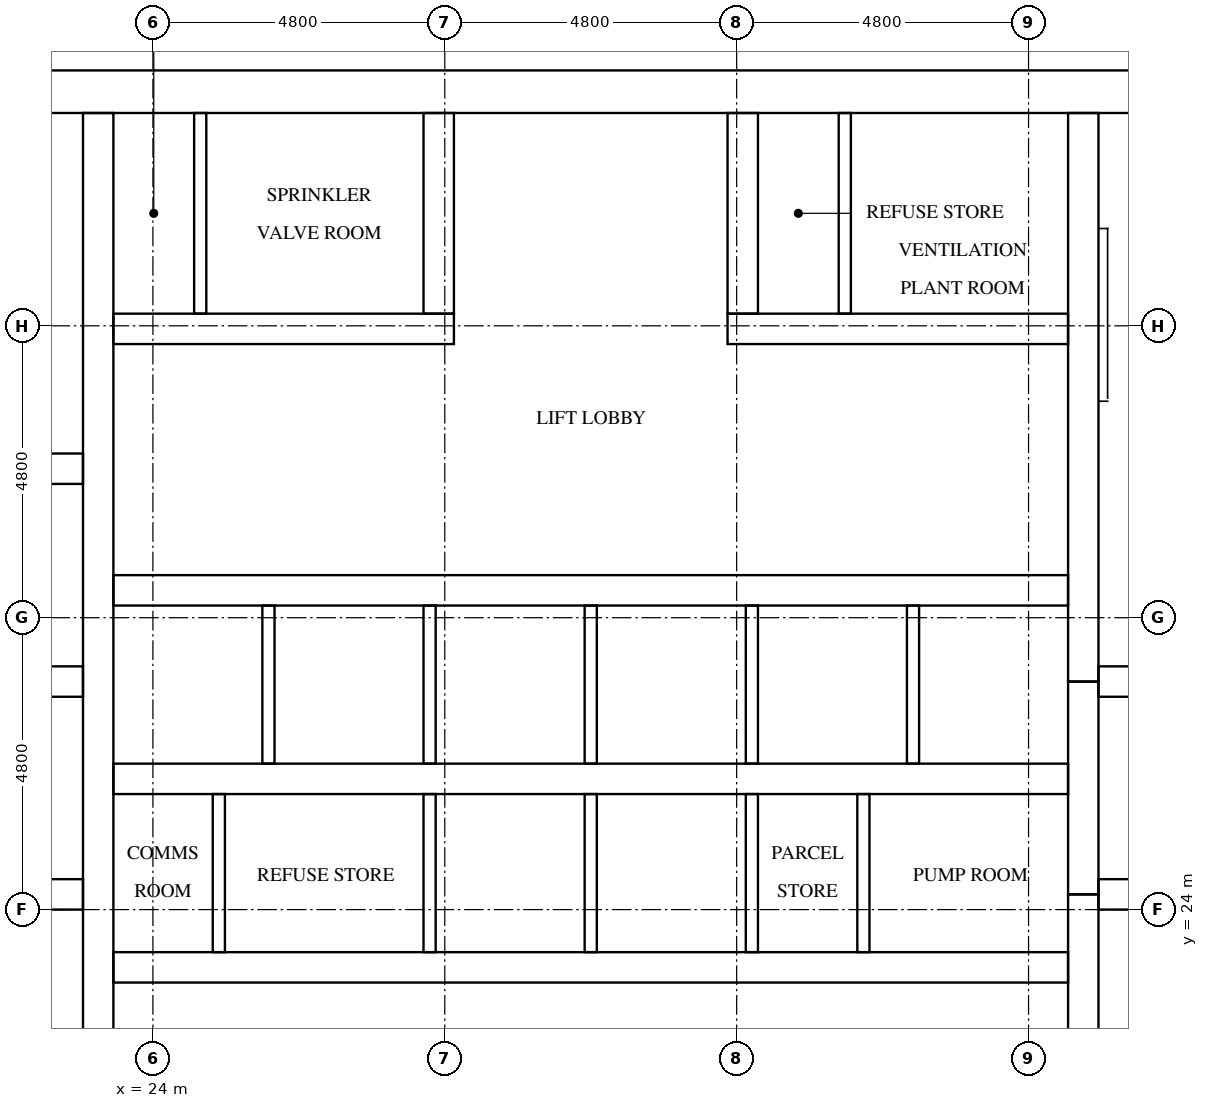
"""IFC4 building model, lengths in metres.
Left out: names, types, materials, properties, quantities, classifications, styles, units other than length and angle.
Written with IfcOpenShell. Run it as: python <this file> out.ifc"""

import sys

from ifc_helpers import new_model, si_unit, direction, frame, frame_2d, origin, place, context, subcontext, project, spatial, rectangle, extrude, element, fill, save


model = new_model("IFC4")
c1 = context("Model", 3, precision=1e-05, world=origin(), true_north=direction((0.0, 1.0)))
c2 = subcontext(c1, "Body", "Model", "MODEL_VIEW")
j1 = project(units=[si_unit("LENGTHUNIT", "METRE"), si_unit("PLANEANGLEUNIT", "RADIAN")], contexts=[c1])
p1 = place(None, origin())
s1 = spatial("IfcSite", under=j1, at=p1, CompositionType="ELEMENT")
p2 = place(p1, origin())
s2 = spatial("IfcBuilding", under=s1, at=p2, CompositionType="ELEMENT")
p3 = place(p2, frame((0.0, 0.0, 178.9)))
s3 = spatial("IfcBuildingStorey", under=s2, at=p3, CompositionType="ELEMENT", Elevation=178.9)
p4 = place(p3, frame((15.0, 37.45, 0.0), z_axis=(0.0, 0.0, 1.0), x_axis=(1.0, 0.0, 0.0)))
e1 = element("IfcWall", 1, at=p4, inside=s3, PredefinedType="SHEAR", context=c2, shape_type="SweptSolid", body=[
    extrude(rectangle(XDim=32.4, YDim=0.7, at=frame_2d((16.2, 0.0))), origin(), (0.0, 0.0, 1.0), 3.2),
])
p5 = place(p4, frame((15.3, 0.0, 0.0)))
e2 = element("IfcOpeningElement", 2, at=p5, cuts=e1, PredefinedType="OPENING", context=c2, shape_type="SweptSolid", body=[
    extrude(rectangle(XDim=1.8, YDim=2.1, at=frame_2d((0.9, 1.05))), frame((0.0, 0.36, 0.0), z_axis=(0.0, -1.0, 0.0), x_axis=(1.0, 0.0, 0.0)), (0.0, 0.0, 1.0), 0.72),
])
p6 = place(p4, frame((1.544, 0.0, 0.0)))
e3 = element("IfcOpeningElement", 3, at=p6, cuts=e1, PredefinedType="OPENING", context=c2, shape_type="SweptSolid", body=[
    extrude(rectangle(XDim=1.0, YDim=2.1, at=frame_2d((0.5, 1.05))), frame((0.0, 0.36, 0.0), z_axis=(0.0, -1.0, 0.0), x_axis=(1.0, 0.0, 0.0)), (0.0, 0.0, 1.0), 0.72),
])
p7 = place(p4, frame((5.219, 0.0, 0.0)))
e4 = element("IfcOpeningElement", 4, at=p7, cuts=e1, PredefinedType="OPENING", context=c2, shape_type="SweptSolid", body=[
    extrude(rectangle(XDim=1.0, YDim=2.1, at=frame_2d((0.5, 1.05))), frame((0.0, 0.36, 0.0), z_axis=(0.0, -1.0, 0.0), x_axis=(1.0, 0.0, 0.0)), (0.0, 0.0, 1.0), 0.72),
])
p8 = place(p3, frame((23.1, 15.7, 0.0), z_axis=(0.0, 0.0, 1.0), x_axis=(0.0, 1.0, 0.0)))
e5 = element("IfcWall", 5, at=p8, inside=s3, PredefinedType="SHEAR", context=c2, shape_type="SweptSolid", body=[
    extrude(rectangle(XDim=21.4, YDim=0.5, at=frame_2d((10.7, 0.0))), origin(), (0.0, 0.0, 1.0), 3.2),
])
p9 = place(p3, frame((39.3, 15.7, 0.0), z_axis=(0.0, 0.0, 1.0), x_axis=(0.0, 1.0, 0.0)))
e6 = element("IfcWall", 6, at=p9, inside=s3, PredefinedType="SHEAR", context=c2, shape_type="SweptSolid", body=[
    extrude(rectangle(XDim=8.55, YDim=0.5, at=frame_2d((4.275, 0.0))), origin(), (0.0, 0.0, 1.0), 3.2),
])
p10 = place(p3, frame((39.3, 24.25, 0.0), z_axis=(0.0, 0.0, 1.0), x_axis=(0.0, 1.0, 0.0)))
e7 = element("IfcWall", 7, at=p10, inside=s3, PredefinedType="SHEAR", context=c2, shape_type="SweptSolid", body=[
    extrude(rectangle(XDim=3.5, YDim=0.5, at=frame_2d((1.75, 0.0))), origin(), (0.0, 0.0, 1.0), 3.2),
])
p11 = place(p3, frame((39.3, 27.75, 0.0), z_axis=(0.0, 0.0, 1.0), x_axis=(0.0, 1.0, 0.0)))
e8 = element("IfcWall", 8, at=p11, inside=s3, PredefinedType="SHEAR", context=c2, shape_type="SweptSolid", body=[
    extrude(rectangle(XDim=9.35, YDim=0.5, at=frame_2d((4.675, 0.0))), origin(), (0.0, 0.0, 1.0), 3.2),
])
for number, where, z_axis, x_axis in (
    (9, (19.3, 24.25, 0.0), (0.0, 0.0, 1.0), (1.0, 0.0, 0.0)),
    (10, (19.3, 27.75, 0.0), (0.0, 0.0, 1.0), (1.0, 0.0, 0.0)),
):
    element("IfcWall", number, at=place(p3, frame(where, z_axis=z_axis, x_axis=x_axis)), inside=s3, PredefinedType="SHEAR", context=c2, shape_type="SweptSolid", body=[
        extrude(rectangle(XDim=3.55, YDim=0.5, at=frame_2d((1.775, 0.0))), origin(), (0.0, 0.0, 1.0), 3.2),
    ])
p12 = place(p3, frame((15.7, 31.25, 0.0), z_axis=(0.0, 0.0, 1.0), x_axis=(1.0, 0.0, 0.0)))
e11 = element("IfcWall", 11, at=p12, inside=s3, PredefinedType="SHEAR", context=c2, shape_type="SweptSolid", body=[
    extrude(rectangle(XDim=7.15, YDim=0.5, at=frame_2d((3.575, 0.0))), origin(), (0.0, 0.0, 1.0), 3.2),
])
for number, where, z_axis, x_axis in (
    (12, (39.55, 24.25, 0.0), (0.0, 0.0, 1.0), (1.0, 0.0, 0.0)),
    (13, (39.55, 27.75, 0.0), (0.0, 0.0, 1.0), (1.0, 0.0, 0.0)),
):
    element("IfcWall", number, at=place(p3, frame(where, z_axis=z_axis, x_axis=x_axis)), inside=s3, PredefinedType="SHEAR", context=c2, shape_type="SweptSolid", body=[
        extrude(rectangle(XDim=3.55, YDim=0.5, at=frame_2d((1.775, 0.0))), origin(), (0.0, 0.0, 1.0), 3.2),
    ])
p13 = place(p3, frame((23.35, 23.05, 0.0), z_axis=(0.0, 0.0, 1.0), x_axis=(1.0, 0.0, 0.0)))
e14 = element("IfcWall", 14, at=p13, inside=s3, PredefinedType="SHEAR", context=c2, shape_type="SweptSolid", body=[
    extrude(rectangle(XDim=15.7, YDim=0.5, at=frame_2d((7.85, 0.0))), origin(), (0.0, 0.0, 1.0), 3.2),
])
p14 = place(p13, frame((0.317, 0.0, 0.0)))
e15 = element("IfcOpeningElement", 15, at=p14, cuts=e14, PredefinedType="OPENING", context=c2, shape_type="SweptSolid", body=[
    extrude(rectangle(XDim=1.0, YDim=2.1, at=frame_2d((0.5, 1.05))), frame((0.0, 0.26, 0.0), z_axis=(0.0, -1.0, 0.0), x_axis=(1.0, 0.0, 0.0)), (0.0, 0.0, 1.0), 0.52),
])
p15 = place(p13, frame((2.967, 0.0, 0.0)))
e16 = element("IfcOpeningElement", 16, at=p15, cuts=e14, PredefinedType="OPENING", context=c2, shape_type="SweptSolid", body=[
    extrude(rectangle(XDim=1.0, YDim=2.1, at=frame_2d((0.5, 1.05))), frame((0.0, 0.26, 0.0), z_axis=(0.0, -1.0, 0.0), x_axis=(1.0, 0.0, 0.0)), (0.0, 0.0, 1.0), 0.52),
])
p16 = place(p13, frame((10.917, 0.0, 0.0)))
e17 = element("IfcOpeningElement", 17, at=p16, cuts=e14, PredefinedType="OPENING", context=c2, shape_type="SweptSolid", body=[
    extrude(rectangle(XDim=1.0, YDim=2.1, at=frame_2d((0.5, 1.05))), frame((0.0, 0.26, 0.0), z_axis=(0.0, -1.0, 0.0), x_axis=(1.0, 0.0, 0.0)), (0.0, 0.0, 1.0), 0.52),
])
p17 = place(p13, frame((13.567, 0.0, 0.0)))
e18 = element("IfcOpeningElement", 18, at=p17, cuts=e14, PredefinedType="OPENING", context=c2, shape_type="SweptSolid", body=[
    extrude(rectangle(XDim=1.0, YDim=2.1, at=frame_2d((0.5, 1.05))), frame((0.0, 0.26, 0.0), z_axis=(0.0, -1.0, 0.0), x_axis=(1.0, 0.0, 0.0)), (0.0, 0.0, 1.0), 0.52),
])
p18 = place(p3, frame((23.35, 26.15, 0.0), z_axis=(0.0, 0.0, 1.0), x_axis=(1.0, 0.0, 0.0)))
e19 = element("IfcWall", 19, at=p18, inside=s3, PredefinedType="SHEAR", context=c2, shape_type="SweptSolid", body=[
    extrude(rectangle(XDim=15.7, YDim=0.5, at=frame_2d((7.85, 0.0))), origin(), (0.0, 0.0, 1.0), 3.2),
])
p19 = place(p3, frame((23.35, 29.25, 0.0), z_axis=(0.0, 0.0, 1.0), x_axis=(1.0, 0.0, 0.0)))
e20 = element("IfcWall", 20, at=p19, inside=s3, PredefinedType="SHEAR", context=c2, shape_type="SweptSolid", body=[
    extrude(rectangle(XDim=15.7, YDim=0.5, at=frame_2d((7.85, 0.0))), origin(), (0.0, 0.0, 1.0), 3.2),
])
p20 = place(p19, frame((0.675, 0.0, 0.0)))
e21 = element("IfcOpeningElement", 21, at=p20, cuts=e20, PredefinedType="OPENING", context=c2, shape_type="SweptSolid", body=[
    extrude(rectangle(XDim=1.1, YDim=2.1, at=frame_2d((0.55, 1.05))), frame((0.0, 0.26, 0.0), z_axis=(0.0, -1.0, 0.0), x_axis=(1.0, 0.0, 0.0)), (0.0, 0.0, 1.0), 0.52),
])
p21 = place(p19, frame((3.325, 0.0, 0.0)))
e22 = element("IfcOpeningElement", 22, at=p21, cuts=e20, PredefinedType="OPENING", context=c2, shape_type="SweptSolid", body=[
    extrude(rectangle(XDim=1.1, YDim=2.1, at=frame_2d((0.55, 1.05))), frame((0.0, 0.26, 0.0), z_axis=(0.0, -1.0, 0.0), x_axis=(1.0, 0.0, 0.0)), (0.0, 0.0, 1.0), 0.52),
])
p22 = place(p19, frame((5.975, 0.0, 0.0)))
e23 = element("IfcOpeningElement", 23, at=p22, cuts=e20, PredefinedType="OPENING", context=c2, shape_type="SweptSolid", body=[
    extrude(rectangle(XDim=1.1, YDim=2.1, at=frame_2d((0.55, 1.05))), frame((0.0, 0.26, 0.0), z_axis=(0.0, -1.0, 0.0), x_axis=(1.0, 0.0, 0.0)), (0.0, 0.0, 1.0), 0.52),
])
p23 = place(p19, frame((8.625, 0.0, 0.0)))
e24 = element("IfcOpeningElement", 24, at=p23, cuts=e20, PredefinedType="OPENING", context=c2, shape_type="SweptSolid", body=[
    extrude(rectangle(XDim=1.1, YDim=2.1, at=frame_2d((0.55, 1.05))), frame((0.0, 0.26, 0.0), z_axis=(0.0, -1.0, 0.0), x_axis=(1.0, 0.0, 0.0)), (0.0, 0.0, 1.0), 0.52),
])
p24 = place(p19, frame((11.275, 0.0, 0.0)))
e25 = element("IfcOpeningElement", 25, at=p24, cuts=e20, PredefinedType="OPENING", context=c2, shape_type="SweptSolid", body=[
    extrude(rectangle(XDim=1.1, YDim=2.1, at=frame_2d((0.55, 1.05))), frame((0.0, 0.26, 0.0), z_axis=(0.0, -1.0, 0.0), x_axis=(1.0, 0.0, 0.0)), (0.0, 0.0, 1.0), 0.52),
])
p25 = place(p19, frame((13.925, 0.0, 0.0)))
e26 = element("IfcOpeningElement", 26, at=p25, cuts=e20, PredefinedType="OPENING", context=c2, shape_type="SweptSolid", body=[
    extrude(rectangle(XDim=1.1, YDim=2.1, at=frame_2d((0.55, 1.05))), frame((0.0, 0.26, 0.0), z_axis=(0.0, -1.0, 0.0), x_axis=(1.0, 0.0, 0.0)), (0.0, 0.0, 1.0), 0.52),
])
p26 = place(p3, frame((23.35, 33.55, 0.0), z_axis=(0.0, 0.0, 1.0), x_axis=(1.0, 0.0, 0.0)))
e27 = element("IfcWall", 27, at=p26, inside=s3, PredefinedType="SHEAR", context=c2, shape_type="SweptSolid", body=[
    extrude(rectangle(XDim=5.6, YDim=0.5, at=frame_2d((2.8, 0.0))), origin(), (0.0, 0.0, 1.0), 3.2),
])
p27 = place(p26, frame((0.164, 0.0, 0.0)))
e28 = element("IfcOpeningElement", 28, at=p27, cuts=e27, PredefinedType="OPENING", context=c2, shape_type="SweptSolid", body=[
    extrude(rectangle(XDim=1.0, YDim=2.1, at=frame_2d((0.5, 1.05))), frame((0.0, 0.26, 0.0), z_axis=(0.0, -1.0, 0.0), x_axis=(1.0, 0.0, 0.0)), (0.0, 0.0, 1.0), 0.52),
])
p28 = place(p26, frame((2.814, 0.0, 0.0)))
e29 = element("IfcOpeningElement", 29, at=p28, cuts=e27, PredefinedType="OPENING", context=c2, shape_type="SweptSolid", body=[
    extrude(rectangle(XDim=1.0, YDim=2.1, at=frame_2d((0.5, 1.05))), frame((0.0, 0.26, 0.0), z_axis=(0.0, -1.0, 0.0), x_axis=(1.0, 0.0, 0.0)), (0.0, 0.0, 1.0), 0.52),
])
p29 = place(p3, frame((33.45, 33.55, 0.0), z_axis=(0.0, 0.0, 1.0), x_axis=(1.0, 0.0, 0.0)))
e30 = element("IfcWall", 30, at=p29, inside=s3, PredefinedType="SHEAR", context=c2, shape_type="SweptSolid", body=[
    extrude(rectangle(XDim=5.6, YDim=0.5, at=frame_2d((2.8, 0.0))), origin(), (0.0, 0.0, 1.0), 3.2),
])
p30 = place(p29, frame((0.664, 0.0, 0.0)))
e31 = element("IfcOpeningElement", 31, at=p30, cuts=e30, PredefinedType="OPENING", context=c2, shape_type="SweptSolid", body=[
    extrude(rectangle(XDim=1.0, YDim=2.1, at=frame_2d((0.5, 1.05))), frame((0.0, 0.26, 0.0), z_axis=(0.0, -1.0, 0.0), x_axis=(1.0, 0.0, 0.0)), (0.0, 0.0, 1.0), 0.52),
])
p31 = place(p29, frame((3.314, 0.0, 0.0)))
e32 = element("IfcOpeningElement", 32, at=p31, cuts=e30, PredefinedType="OPENING", context=c2, shape_type="SweptSolid", body=[
    extrude(rectangle(XDim=1.0, YDim=2.1, at=frame_2d((0.5, 1.05))), frame((0.0, 0.26, 0.0), z_axis=(0.0, -1.0, 0.0), x_axis=(1.0, 0.0, 0.0)), (0.0, 0.0, 1.0), 0.52),
])
for number, where, z_axis, x_axis in (
    (33, (28.7, 33.8, 0.0), (0.0, 0.0, 1.0), (0.0, 1.0, 0.0)),
    (34, (33.7, 33.8, 0.0), (0.0, 0.0, 1.0), (0.0, 1.0, 0.0)),
):
    element("IfcWall", number, at=place(p3, frame(where, z_axis=z_axis, x_axis=x_axis)), inside=s3, PredefinedType="SHEAR", context=c2, shape_type="SweptSolid", body=[
        extrude(rectangle(XDim=3.3, YDim=0.5, at=frame_2d((1.65, 0.0))), origin(), (0.0, 0.0, 1.0), 3.2),
    ])
p32 = place(p3, frame((25.9, 26.4, 0.0), z_axis=(0.0, 0.0, 1.0), x_axis=(0.0, 1.0, 0.0)))
e35 = element("IfcWall", 35, at=p32, inside=s3, PredefinedType="SOLIDWALL", context=c2, shape_type="SweptSolid", body=[
    extrude(rectangle(XDim=2.6, YDim=0.2, at=frame_2d((1.3, 0.0))), origin(), (0.0, 0.0, 1.0), 3.2),
])
p33 = place(p3, frame((28.55, 23.3, 0.0), z_axis=(0.0, 0.0, 1.0), x_axis=(0.0, 1.0, 0.0)))
e36 = element("IfcWall", 36, at=p33, inside=s3, PredefinedType="SOLIDWALL", context=c2, shape_type="SweptSolid", body=[
    extrude(rectangle(XDim=2.6, YDim=0.2, at=frame_2d((1.3, 0.0))), origin(), (0.0, 0.0, 1.0), 3.2),
])
p34 = place(p3, frame((28.55, 26.4, 0.0), z_axis=(0.0, 0.0, 1.0), x_axis=(0.0, 1.0, 0.0)))
e37 = element("IfcWall", 37, at=p34, inside=s3, PredefinedType="SOLIDWALL", context=c2, shape_type="SweptSolid", body=[
    extrude(rectangle(XDim=2.6, YDim=0.2, at=frame_2d((1.3, 0.0))), origin(), (0.0, 0.0, 1.0), 3.2),
])
p35 = place(p3, frame((31.2, 23.3, 0.0), z_axis=(0.0, 0.0, 1.0), x_axis=(0.0, 1.0, 0.0)))
e38 = element("IfcWall", 38, at=p35, inside=s3, PredefinedType="SOLIDWALL", context=c2, shape_type="SweptSolid", body=[
    extrude(rectangle(XDim=2.6, YDim=0.2, at=frame_2d((1.3, 0.0))), origin(), (0.0, 0.0, 1.0), 3.2),
])
p36 = place(p3, frame((31.2, 26.4, 0.0), z_axis=(0.0, 0.0, 1.0), x_axis=(0.0, 1.0, 0.0)))
e39 = element("IfcWall", 39, at=p36, inside=s3, PredefinedType="SOLIDWALL", context=c2, shape_type="SweptSolid", body=[
    extrude(rectangle(XDim=2.6, YDim=0.2, at=frame_2d((1.3, 0.0))), origin(), (0.0, 0.0, 1.0), 3.2),
])
p37 = place(p3, frame((33.85, 23.3, 0.0), z_axis=(0.0, 0.0, 1.0), x_axis=(0.0, 1.0, 0.0)))
e40 = element("IfcWall", 40, at=p37, inside=s3, PredefinedType="SOLIDWALL", context=c2, shape_type="SweptSolid", body=[
    extrude(rectangle(XDim=2.6, YDim=0.2, at=frame_2d((1.3, 0.0))), origin(), (0.0, 0.0, 1.0), 3.2),
])
for number, where, z_axis, x_axis in (
    (41, (33.85, 26.4, 0.0), (0.0, 0.0, 1.0), (0.0, 1.0, 0.0)),
    (42, (36.5, 26.4, 0.0), (0.0, 0.0, 1.0), (0.0, 1.0, 0.0)),
):
    element("IfcWall", number, at=place(p3, frame(where, z_axis=z_axis, x_axis=x_axis)), inside=s3, PredefinedType="SOLIDWALL", context=c2, shape_type="SweptSolid", body=[
        extrude(rectangle(XDim=2.6, YDim=0.2, at=frame_2d((1.3, 0.0))), origin(), (0.0, 0.0, 1.0), 3.2),
    ])
for number, where, z_axis, x_axis in (
    (43, (25.084, 23.3, 0.0), (0.0, 0.0, 1.0), (0.0, 1.0, 0.0)),
    (44, (35.684, 23.3, 0.0), (0.0, 0.0, 1.0), (0.0, 1.0, 0.0)),
):
    element("IfcWall", number, at=place(p3, frame(where, z_axis=z_axis, x_axis=x_axis)), inside=s3, PredefinedType="PARTITIONING", context=c2, shape_type="SweptSolid", body=[
        extrude(rectangle(XDim=2.6, YDim=0.2, at=frame_2d((1.3, 0.0))), origin(), (0.0, 0.0, 1.0), 3.2),
    ])
for number, where, z_axis, x_axis in (
    (45, (24.778, 33.8, 0.0), (0.0, 0.0, 1.0), (0.0, 1.0, 0.0)),
    (46, (35.378, 33.8, 0.0), (0.0, 0.0, 1.0), (0.0, 1.0, 0.0)),
):
    element("IfcWall", number, at=place(p3, frame(where, z_axis=z_axis, x_axis=x_axis)), inside=s3, PredefinedType="PARTITIONING", context=c2, shape_type="SweptSolid", body=[
        extrude(rectangle(XDim=3.3, YDim=0.2, at=frame_2d((1.65, 0.0))), origin(), (0.0, 0.0, 1.0), 3.2),
    ])
p38 = place(p20, origin())
e47 = element("IfcDoor", 47, at=p38, inside=s3, OperationType="DOUBLE_DOOR_SLIDING", PredefinedType="DOOR", context=c2, shape_type="SweptSolid", body=[
    extrude(rectangle(XDim=1.1, YDim=2.1, at=frame_2d((0.55, 1.05))), frame((0.0, 0.025, 0.0), z_axis=(0.0, -1.0, 0.0), x_axis=(1.0, 0.0, 0.0)), (0.0, 0.0, 1.0), 0.05),
])
fill(e21, e47)
p39 = place(p21, origin())
e48 = element("IfcDoor", 48, at=p39, inside=s3, OperationType="DOUBLE_DOOR_SLIDING", PredefinedType="DOOR", context=c2, shape_type="SweptSolid", body=[
    extrude(rectangle(XDim=1.1, YDim=2.1, at=frame_2d((0.55, 1.05))), frame((0.0, 0.025, 0.0), z_axis=(0.0, -1.0, 0.0), x_axis=(1.0, 0.0, 0.0)), (0.0, 0.0, 1.0), 0.05),
])
fill(e22, e48)
p40 = place(p22, origin())
e49 = element("IfcDoor", 49, at=p40, inside=s3, OperationType="DOUBLE_DOOR_SLIDING", PredefinedType="DOOR", context=c2, shape_type="SweptSolid", body=[
    extrude(rectangle(XDim=1.1, YDim=2.1, at=frame_2d((0.55, 1.05))), frame((0.0, 0.025, 0.0), z_axis=(0.0, -1.0, 0.0), x_axis=(1.0, 0.0, 0.0)), (0.0, 0.0, 1.0), 0.05),
])
fill(e23, e49)
p41 = place(p23, origin())
e50 = element("IfcDoor", 50, at=p41, inside=s3, OperationType="DOUBLE_DOOR_SLIDING", PredefinedType="DOOR", context=c2, shape_type="SweptSolid", body=[
    extrude(rectangle(XDim=1.1, YDim=2.1, at=frame_2d((0.55, 1.05))), frame((0.0, 0.025, 0.0), z_axis=(0.0, -1.0, 0.0), x_axis=(1.0, 0.0, 0.0)), (0.0, 0.0, 1.0), 0.05),
])
fill(e24, e50)
p42 = place(p24, origin())
e51 = element("IfcDoor", 51, at=p42, inside=s3, OperationType="DOUBLE_DOOR_SLIDING", PredefinedType="DOOR", context=c2, shape_type="SweptSolid", body=[
    extrude(rectangle(XDim=1.1, YDim=2.1, at=frame_2d((0.55, 1.05))), frame((0.0, 0.025, 0.0), z_axis=(0.0, -1.0, 0.0), x_axis=(1.0, 0.0, 0.0)), (0.0, 0.0, 1.0), 0.05),
])
fill(e25, e51)
p43 = place(p25, origin())
e52 = element("IfcDoor", 52, at=p43, inside=s3, OperationType="DOUBLE_DOOR_SLIDING", PredefinedType="DOOR", context=c2, shape_type="SweptSolid", body=[
    extrude(rectangle(XDim=1.1, YDim=2.1, at=frame_2d((0.55, 1.05))), frame((0.0, 0.025, 0.0), z_axis=(0.0, -1.0, 0.0), x_axis=(1.0, 0.0, 0.0)), (0.0, 0.0, 1.0), 0.05),
])
fill(e26, e52)
p44 = place(p5, origin())
e53 = element("IfcDoor", 53, at=p44, inside=s3, OperationType="DOUBLE_DOOR_SINGLE_SWING", PredefinedType="DOOR", context=c2, shape_type="SweptSolid", body=[
    extrude(rectangle(XDim=1.8, YDim=2.1, at=frame_2d((0.9, 1.05))), frame((0.0, 0.025, 0.0), z_axis=(0.0, -1.0, 0.0), x_axis=(1.0, 0.0, 0.0)), (0.0, 0.0, 1.0), 0.05),
])
fill(e2, e53)
p45 = place(p14, frame((1.0, 0.0, 0.0), z_axis=(0.0, 0.0, 1.0), x_axis=(-1.0, 0.0, 0.0)))
e54 = element("IfcDoor", 54, at=p45, inside=s3, OperationType="SINGLE_SWING_LEFT", PredefinedType="DOOR", context=c2, shape_type="SweptSolid", body=[
    extrude(rectangle(XDim=1.0, YDim=2.1, at=frame_2d((0.5, 1.05))), frame((0.0, 0.025, 0.0), z_axis=(0.0, -1.0, 0.0), x_axis=(1.0, 0.0, 0.0)), (0.0, 0.0, 1.0), 0.05),
])
fill(e15, e54)
p46 = place(p15, frame((1.0, 0.0, 0.0), z_axis=(0.0, 0.0, 1.0), x_axis=(-1.0, 0.0, 0.0)))
e55 = element("IfcDoor", 55, at=p46, inside=s3, OperationType="SINGLE_SWING_RIGHT", PredefinedType="DOOR", context=c2, shape_type="SweptSolid", body=[
    extrude(rectangle(XDim=1.0, YDim=2.1, at=frame_2d((0.5, 1.05))), frame((0.0, 0.025, 0.0), z_axis=(0.0, -1.0, 0.0), x_axis=(1.0, 0.0, 0.0)), (0.0, 0.0, 1.0), 0.05),
])
fill(e16, e55)
p47 = place(p16, frame((1.0, 0.0, 0.0), z_axis=(0.0, 0.0, 1.0), x_axis=(-1.0, 0.0, 0.0)))
e56 = element("IfcDoor", 56, at=p47, inside=s3, OperationType="SINGLE_SWING_LEFT", PredefinedType="DOOR", context=c2, shape_type="SweptSolid", body=[
    extrude(rectangle(XDim=1.0, YDim=2.1, at=frame_2d((0.5, 1.05))), frame((0.0, 0.025, 0.0), z_axis=(0.0, -1.0, 0.0), x_axis=(1.0, 0.0, 0.0)), (0.0, 0.0, 1.0), 0.05),
])
fill(e17, e56)
p48 = place(p17, frame((1.0, 0.0, 0.0), z_axis=(0.0, 0.0, 1.0), x_axis=(-1.0, 0.0, 0.0)))
e57 = element("IfcDoor", 57, at=p48, inside=s3, OperationType="SINGLE_SWING_RIGHT", PredefinedType="DOOR", context=c2, shape_type="SweptSolid", body=[
    extrude(rectangle(XDim=1.0, YDim=2.1, at=frame_2d((0.5, 1.05))), frame((0.0, 0.025, 0.0), z_axis=(0.0, -1.0, 0.0), x_axis=(1.0, 0.0, 0.0)), (0.0, 0.0, 1.0), 0.05),
])
fill(e18, e57)
p49 = place(p27, frame((1.0, 0.0, 0.0), z_axis=(0.0, 0.0, 1.0), x_axis=(-1.0, 0.0, 0.0)))
e58 = element("IfcDoor", 58, at=p49, inside=s3, OperationType="SINGLE_SWING_LEFT", PredefinedType="DOOR", context=c2, shape_type="SweptSolid", body=[
    extrude(rectangle(XDim=1.0, YDim=2.1, at=frame_2d((0.5, 1.05))), frame((0.0, 0.025, 0.0), z_axis=(0.0, -1.0, 0.0), x_axis=(1.0, 0.0, 0.0)), (0.0, 0.0, 1.0), 0.05),
])
fill(e28, e58)
p50 = place(p28, frame((1.0, 0.0, 0.0), z_axis=(0.0, 0.0, 1.0), x_axis=(-1.0, 0.0, 0.0)))
e59 = element("IfcDoor", 59, at=p50, inside=s3, OperationType="SINGLE_SWING_RIGHT", PredefinedType="DOOR", context=c2, shape_type="SweptSolid", body=[
    extrude(rectangle(XDim=1.0, YDim=2.1, at=frame_2d((0.5, 1.05))), frame((0.0, 0.025, 0.0), z_axis=(0.0, -1.0, 0.0), x_axis=(1.0, 0.0, 0.0)), (0.0, 0.0, 1.0), 0.05),
])
fill(e29, e59)
p51 = place(p30, frame((1.0, 0.0, 0.0), z_axis=(0.0, 0.0, 1.0), x_axis=(-1.0, 0.0, 0.0)))
e60 = element("IfcDoor", 60, at=p51, inside=s3, OperationType="SINGLE_SWING_LEFT", PredefinedType="DOOR", context=c2, shape_type="SweptSolid", body=[
    extrude(rectangle(XDim=1.0, YDim=2.1, at=frame_2d((0.5, 1.05))), frame((0.0, 0.025, 0.0), z_axis=(0.0, -1.0, 0.0), x_axis=(1.0, 0.0, 0.0)), (0.0, 0.0, 1.0), 0.05),
])
fill(e31, e60)
p52 = place(p31, frame((1.0, 0.0, 0.0), z_axis=(0.0, 0.0, 1.0), x_axis=(-1.0, 0.0, 0.0)))
e61 = element("IfcDoor", 61, at=p52, inside=s3, OperationType="SINGLE_SWING_RIGHT", PredefinedType="DOOR", context=c2, shape_type="SweptSolid", body=[
    extrude(rectangle(XDim=1.0, YDim=2.1, at=frame_2d((0.5, 1.05))), frame((0.0, 0.025, 0.0), z_axis=(0.0, -1.0, 0.0), x_axis=(1.0, 0.0, 0.0)), (0.0, 0.0, 1.0), 0.05),
])
fill(e32, e61)
save(model, sys.argv[1])
